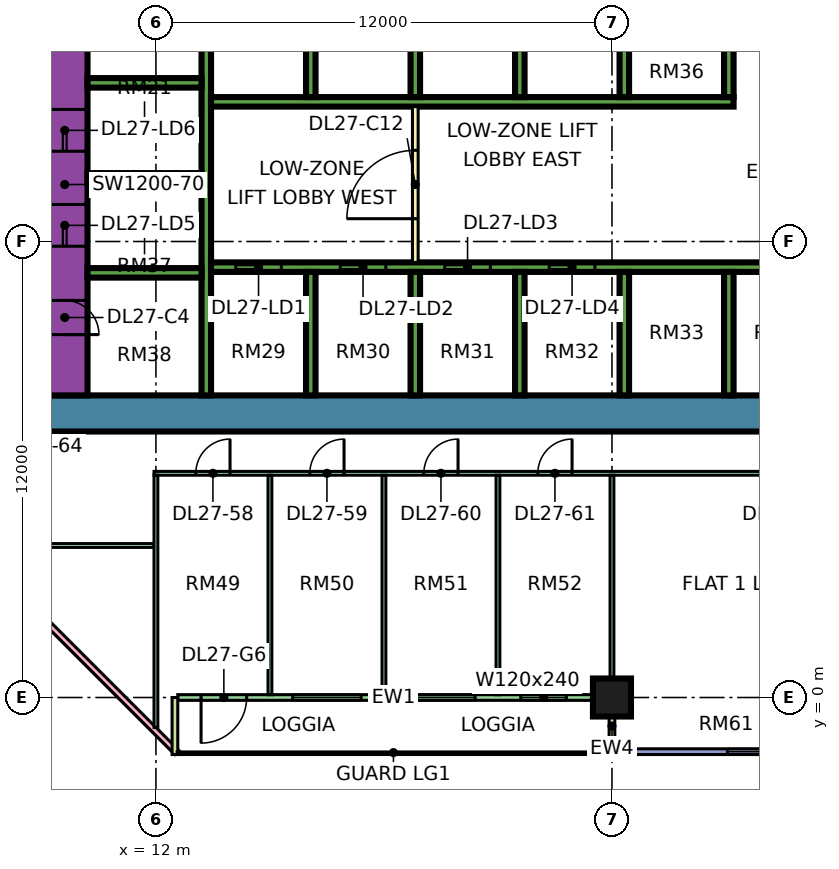
"""IFC4 building model, lengths in metres.
Left out: names, types, materials, properties, quantities, classifications, styles, units other than length and angle.
Written with IfcOpenShell. Run it as: python <this file> out.ifc"""

import sys

from ifc_helpers import new_model, si_unit, direction, frame, frame_2d, origin, origin_2d, place, context, subcontext, project, spatial, rectangle, extrude, element, fill, save


model = new_model("IFC4")
c1 = context("Model", 3, precision=1e-05, world=origin(), true_north=direction((0.0, 1.0)))
c2 = subcontext(c1, "Body", "Model", "MODEL_VIEW")
j1 = project(units=[si_unit("LENGTHUNIT", "METRE"), si_unit("PLANEANGLEUNIT", "RADIAN")], contexts=[c1])
p1 = place(None, origin())
s1 = spatial("IfcSite", under=j1, at=p1, CompositionType="ELEMENT")
p2 = place(p1, origin())
s2 = spatial("IfcBuilding", under=s1, at=p2, CompositionType="ELEMENT")
p3 = place(p2, frame((0.0, 0.0, 118.15)))
s3 = spatial("IfcBuildingStorey", under=s2, at=p3, CompositionType="ELEMENT", Elevation=118.15)
p4 = place(p3, frame((24.0, 0.0, 0.0), z_axis=(0.0, 0.0, 1.0), x_axis=(1.0, 0.0, 0.0)))
e1 = element("IfcColumn", 1, at=p4, inside=s3, PredefinedType="COLUMN", context=c2, shape_type="SweptSolid", body=[
    extrude(rectangle(XDim=1.0, YDim=1.0, at=origin_2d()), origin(), (0.0, 0.0, 1.0), 3.75),
])
p5 = place(p3, frame((9.0, 7.475, 0.0), z_axis=(0.0, 0.0, 1.0), x_axis=(1.0, 0.0, 0.0)))
e2 = element("IfcWall", 2, at=p5, inside=s3, PredefinedType="SHEAR", context=c2, shape_type="SweptSolid", body=[
    extrude(rectangle(XDim=25.0, YDim=0.95, at=frame_2d((12.5, 0.0))), origin(), (0.0, 0.0, 1.0), 3.75),
])
p6 = place(p3, frame((9.6, 7.95, 0.0), z_axis=(0.0, 0.0, 1.0), x_axis=(0.0, 1.0, 0.0)))
e3 = element("IfcWall", 3, at=p6, inside=s3, PredefinedType="SHEAR", context=c2, shape_type="SweptSolid", body=[
    extrude(rectangle(XDim=11.1, YDim=1.2, at=frame_2d((5.55, 0.0))), origin(), (0.0, 0.0, 1.0), 3.75),
])
p7 = place(p6, frame((3.925, 0.0, 0.0)))
e4 = element("IfcOpeningElement", 4, at=p7, cuts=e3, PredefinedType="OPENING", context=c2, shape_type="SweptSolid", body=[
    extrude(rectangle(XDim=1.1, YDim=2.2, at=frame_2d((0.55, 1.1))), frame((0.0, 0.61, 0.0), z_axis=(0.0, -1.0, 0.0), x_axis=(1.0, 0.0, 0.0)), (0.0, 0.0, 1.0), 1.22),
])
p8 = place(p6, frame((6.425, 0.0, 0.0)))
e5 = element("IfcOpeningElement", 5, at=p8, cuts=e3, PredefinedType="OPENING", context=c2, shape_type="SweptSolid", body=[
    extrude(rectangle(XDim=1.1, YDim=2.2, at=frame_2d((0.55, 1.1))), frame((0.0, 0.61, 0.0), z_axis=(0.0, -1.0, 0.0), x_axis=(1.0, 0.0, 0.0)), (0.0, 0.0, 1.0), 1.22),
])
p9 = place(p6, frame((9.175, 0.0, 0.0)))
e6 = element("IfcOpeningElement", 6, at=p9, cuts=e3, PredefinedType="OPENING", context=c2, shape_type="SweptSolid", body=[
    extrude(rectangle(XDim=1.1, YDim=2.2, at=frame_2d((0.55, 1.1))), frame((0.0, 0.61, 0.0), z_axis=(0.0, -1.0, 0.0), x_axis=(1.0, 0.0, 0.0)), (0.0, 0.0, 1.0), 1.22),
])
p10 = place(p6, frame((1.6, 0.0, 0.0)))
e7 = element("IfcOpeningElement", 7, at=p10, cuts=e3, PredefinedType="OPENING", context=c2, shape_type="SweptSolid", body=[
    extrude(rectangle(XDim=0.9, YDim=2.1, at=frame_2d((0.45, 1.05))), frame((0.0, 0.61, 0.0), z_axis=(0.0, -1.0, 0.0), x_axis=(1.0, 0.0, 0.0)), (0.0, 0.0, 1.0), 1.22),
])
p11 = place(p3, frame((13.325, 7.95, 0.0), z_axis=(0.0, 0.0, 1.0), x_axis=(0.0, 1.0, 0.0)))
e8 = element("IfcWall", 8, at=p11, inside=s3, PredefinedType="SHEAR", context=c2, shape_type="SweptSolid", body=[
    extrude(rectangle(XDim=11.1, YDim=0.25, at=frame_2d((5.55, 0.0))), origin(), (0.0, 0.0, 1.0), 3.75),
])
p12 = place(p3, frame((13.45, 11.325, 0.0), z_axis=(0.0, 0.0, 1.0), x_axis=(1.0, 0.0, 0.0)))
e9 = element("IfcWall", 9, at=p12, inside=s3, PredefinedType="SHEAR", context=c2, shape_type="SweptSolid", body=[
    extrude(rectangle(XDim=19.6, YDim=0.25, at=frame_2d((9.8, 0.0))), origin(), (0.0, 0.0, 1.0), 3.75),
])
p13 = place(p12, frame((0.65, 0.0, 0.0)))
e10 = element("IfcOpeningElement", 10, at=p13, cuts=e9, PredefinedType="OPENING", context=c2, shape_type="SweptSolid", body=[
    extrude(rectangle(XDim=1.2, YDim=2.2, at=frame_2d((0.6, 1.1))), frame((0.0, 0.135, 0.0), z_axis=(0.0, -1.0, 0.0), x_axis=(1.0, 0.0, 0.0)), (0.0, 0.0, 1.0), 0.27),
])
p14 = place(p12, frame((3.4, 0.0, 0.0)))
e11 = element("IfcOpeningElement", 11, at=p14, cuts=e9, PredefinedType="OPENING", context=c2, shape_type="SweptSolid", body=[
    extrude(rectangle(XDim=1.2, YDim=2.2, at=frame_2d((0.6, 1.1))), frame((0.0, 0.135, 0.0), z_axis=(0.0, -1.0, 0.0), x_axis=(1.0, 0.0, 0.0)), (0.0, 0.0, 1.0), 0.27),
])
p15 = place(p12, frame((6.15, 0.0, 0.0)))
e12 = element("IfcOpeningElement", 12, at=p15, cuts=e9, PredefinedType="OPENING", context=c2, shape_type="SweptSolid", body=[
    extrude(rectangle(XDim=1.2, YDim=2.2, at=frame_2d((0.6, 1.1))), frame((0.0, 0.135, 0.0), z_axis=(0.0, -1.0, 0.0), x_axis=(1.0, 0.0, 0.0)), (0.0, 0.0, 1.0), 0.27),
])
p16 = place(p12, frame((8.9, 0.0, 0.0)))
e13 = element("IfcOpeningElement", 13, at=p16, cuts=e9, PredefinedType="OPENING", context=c2, shape_type="SweptSolid", body=[
    extrude(rectangle(XDim=1.2, YDim=2.2, at=frame_2d((0.6, 1.1))), frame((0.0, 0.135, 0.0), z_axis=(0.0, -1.0, 0.0), x_axis=(1.0, 0.0, 0.0)), (0.0, 0.0, 1.0), 0.27),
])
p17 = place(p3, frame((13.45, 15.675, 0.0), z_axis=(0.0, 0.0, 1.0), x_axis=(1.0, 0.0, 0.0)))
e14 = element("IfcWall", 14, at=p17, inside=s3, PredefinedType="SHEAR", context=c2, shape_type="SweptSolid", body=[
    extrude(rectangle(XDim=13.75, YDim=0.25, at=frame_2d((6.875, 0.0))), origin(), (0.0, 0.0, 1.0), 3.75),
])
for number, where, z_axis, x_axis in (
    (15, (10.2, 11.175, 0.0), (0.0, 0.0, 1.0), (1.0, 0.0, 0.0)),
    (16, (10.2, 13.675, 0.0), (0.0, 0.0, 1.0), (1.0, 0.0, 0.0)),
    (17, (10.2, 16.175, 0.0), (0.0, 0.0, 1.0), (1.0, 0.0, 0.0)),
):
    element("IfcWall", number, at=place(p3, frame(where, z_axis=z_axis, x_axis=x_axis)), inside=s3, PredefinedType="SHEAR", context=c2, shape_type="SweptSolid", body=[
        extrude(rectangle(XDim=3.0, YDim=0.25, at=frame_2d((1.5, 0.0))), origin(), (0.0, 0.0, 1.0), 3.75),
    ])
for number, where, z_axis, x_axis in (
    (18, (16.075, 7.95, 0.0), (0.0, 0.0, 1.0), (0.0, 1.0, 0.0)),
    (19, (18.825, 7.95, 0.0), (0.0, 0.0, 1.0), (0.0, 1.0, 0.0)),
    (20, (21.575, 7.95, 0.0), (0.0, 0.0, 1.0), (0.0, 1.0, 0.0)),
    (21, (24.325, 7.95, 0.0), (0.0, 0.0, 1.0), (0.0, 1.0, 0.0)),
    (22, (27.075, 7.95, 0.0), (0.0, 0.0, 1.0), (0.0, 1.0, 0.0)),
    (23, (16.075, 15.8, 0.0), (0.0, 0.0, 1.0), (0.0, 1.0, 0.0)),
    (24, (18.825, 15.8, 0.0), (0.0, 0.0, 1.0), (0.0, 1.0, 0.0)),
    (25, (21.575, 15.8, 0.0), (0.0, 0.0, 1.0), (0.0, 1.0, 0.0)),
    (26, (24.325, 15.8, 0.0), (0.0, 0.0, 1.0), (0.0, 1.0, 0.0)),
    (27, (27.075, 15.8, 0.0), (0.0, 0.0, 1.0), (0.0, 1.0, 0.0)),
):
    element("IfcWall", number, at=place(p3, frame(where, z_axis=z_axis, x_axis=x_axis)), inside=s3, PredefinedType="SHEAR", context=c2, shape_type="SweptSolid", body=[
        extrude(rectangle(XDim=3.25, YDim=0.25, at=frame_2d((1.625, 0.0))), origin(), (0.0, 0.0, 1.0), 3.75),
    ])
p18 = place(p3, frame((-1.447, 12.553, 0.0), z_axis=(0.0, 0.0, 1.0), x_axis=(0.707106781187, -0.707106781187, 0.0)))
e28 = element("IfcWall", 28, at=p18, inside=s3, PredefinedType="SOLIDWALL", context=c2, shape_type="SweptSolid", body=[
    extrude(rectangle(XDim=19.799, YDim=0.15, at=frame_2d((9.899, 0.0))), origin(), (0.0, 0.0, 1.0), 3.35),
])
p19 = place(p18, frame((2.212, 0.0, 0.45)))
e29 = element("IfcOpeningElement", 29, at=p19, cuts=e28, PredefinedType="OPENING", context=c2, shape_type="SweptSolid", body=[
    extrude(rectangle(XDim=3.0, YDim=2.4, at=frame_2d((1.5, 1.2))), frame((0.0, 0.085, 0.0), z_axis=(0.0, -1.0, 0.0), x_axis=(1.0, 0.0, 0.0)), (0.0, 0.0, 1.0), 0.17),
])
p20 = place(p18, frame((10.216, 0.0, 0.45)))
e30 = element("IfcOpeningElement", 30, at=p20, cuts=e28, PredefinedType="OPENING", context=c2, shape_type="SweptSolid", body=[
    extrude(rectangle(XDim=3.0, YDim=2.4, at=frame_2d((1.5, 1.2))), frame((0.0, 0.085, 0.0), z_axis=(0.0, -1.0, 0.0), x_axis=(1.0, 0.0, 0.0)), (0.0, 0.0, 1.0), 0.17),
])
p21 = place(p3, frame((12.575, 0.0, 0.0), z_axis=(0.0, 0.0, 1.0), x_axis=(1.0, 0.0, 0.0)))
e31 = element("IfcWall", 31, at=p21, inside=s3, PredefinedType="SOLIDWALL", context=c2, shape_type="SweptSolid", body=[
    extrude(rectangle(XDim=11.35, YDim=0.15, at=frame_2d((5.675, 0.0))), origin(), (0.0, 0.0, 1.0), 3.35),
])
p22 = place(p21, frame((0.613, 0.0, 0.0)))
e32 = element("IfcOpeningElement", 32, at=p22, cuts=e31, PredefinedType="OPENING", context=c2, shape_type="SweptSolid", body=[
    extrude(rectangle(XDim=1.2, YDim=2.4, at=frame_2d((0.6, 1.2))), frame((0.0, 0.085, 0.0), z_axis=(0.0, -1.0, 0.0), x_axis=(1.0, 0.0, 0.0)), (0.0, 0.0, 1.0), 0.17),
])
p23 = place(p21, frame((3.025, 0.0, 0.45)))
e33 = element("IfcOpeningElement", 33, at=p23, cuts=e31, PredefinedType="OPENING", context=c2, shape_type="SweptSolid", body=[
    extrude(rectangle(XDim=1.8, YDim=2.4, at=frame_2d((0.9, 1.2))), frame((0.0, 0.085, 0.0), z_axis=(0.0, -1.0, 0.0), x_axis=(1.0, 0.0, 0.0)), (0.0, 0.0, 1.0), 0.17),
])
p24 = place(p21, frame((6.025, 0.0, 0.45)))
e34 = element("IfcOpeningElement", 34, at=p24, cuts=e31, PredefinedType="OPENING", context=c2, shape_type="SweptSolid", body=[
    extrude(rectangle(XDim=1.8, YDim=2.4, at=frame_2d((0.9, 1.2))), frame((0.0, 0.085, 0.0), z_axis=(0.0, -1.0, 0.0), x_axis=(1.0, 0.0, 0.0)), (0.0, 0.0, 1.0), 0.17),
])
p25 = place(p21, frame((9.025, 0.0, 0.45)))
e35 = element("IfcOpeningElement", 35, at=p25, cuts=e31, PredefinedType="OPENING", context=c2, shape_type="SweptSolid", body=[
    extrude(rectangle(XDim=1.2, YDim=2.4, at=frame_2d((0.6, 1.2))), frame((0.0, 0.085, 0.0), z_axis=(0.0, -1.0, 0.0), x_axis=(1.0, 0.0, 0.0)), (0.0, 0.0, 1.0), 0.17),
])
for number, where, z_axis, x_axis in (
    (36, (12.5, -1.5, 0.0), (0.0, 0.0, 1.0), (0.0, 1.0, 0.0)),
    (37, (24.0, -1.5, 0.0), (0.0, 0.0, 1.0), (0.0, 1.0, 0.0)),
):
    element("IfcWall", number, at=place(p3, frame(where, z_axis=z_axis, x_axis=x_axis)), inside=s3, PredefinedType="SOLIDWALL", context=c2, shape_type="SweptSolid", body=[
        extrude(rectangle(XDim=1.5, YDim=0.15, at=frame_2d((0.75, 0.0))), origin(), (0.0, 0.0, 1.0), 3.35),
    ])
p26 = place(p3, frame((24.075, -1.425, 0.0), z_axis=(0.0, 0.0, 1.0), x_axis=(1.0, 0.0, 0.0)))
e38 = element("IfcWall", 38, at=p26, inside=s3, PredefinedType="SOLIDWALL", context=c2, shape_type="SweptSolid", body=[
    extrude(rectangle(XDim=11.85, YDim=0.15, at=frame_2d((5.925, 0.0))), origin(), (0.0, 0.0, 1.0), 3.35),
])
p27 = place(p26, frame((2.962, 0.0, 0.45)))
e39 = element("IfcOpeningElement", 39, at=p27, cuts=e38, PredefinedType="OPENING", context=c2, shape_type="SweptSolid", body=[
    extrude(rectangle(XDim=3.0, YDim=2.4, at=frame_2d((1.5, 1.2))), frame((0.0, 0.085, 0.0), z_axis=(0.0, -1.0, 0.0), x_axis=(1.0, 0.0, 0.0)), (0.0, 0.0, 1.0), 0.17),
])
p28 = place(p26, frame((9.488, 0.0, 0.45)))
e40 = element("IfcOpeningElement", 40, at=p28, cuts=e38, PredefinedType="OPENING", context=c2, shape_type="SweptSolid", body=[
    extrude(rectangle(XDim=1.8, YDim=2.4, at=frame_2d((0.9, 1.2))), frame((0.0, 0.085, 0.0), z_axis=(0.0, -1.0, 0.0), x_axis=(1.0, 0.0, 0.0)), (0.0, 0.0, 1.0), 0.17),
])
p29 = place(p3, frame((18.825, 11.45, 0.0), z_axis=(0.0, 0.0, 1.0), x_axis=(0.0, 1.0, 0.0)))
e41 = element("IfcWall", 41, at=p29, inside=s3, PredefinedType="PARTITIONING", context=c2, shape_type="SweptSolid", body=[
    extrude(rectangle(XDim=4.1, YDim=0.15, at=frame_2d((2.05, 0.0))), origin(), (0.0, 0.0, 1.0), 3.35),
])
p30 = place(p29, frame((1.15, 0.0, 0.0)))
e42 = element("IfcOpeningElement", 42, at=p30, cuts=e41, PredefinedType="OPENING", context=c2, shape_type="SweptSolid", body=[
    extrude(rectangle(XDim=1.8, YDim=2.4, at=frame_2d((0.9, 1.2))), frame((0.0, 0.085, 0.0), z_axis=(0.0, -1.0, 0.0), x_axis=(1.0, 0.0, 0.0)), (0.0, 0.0, 1.0), 0.17),
])
p31 = place(p3, frame((9.05, 4.0, 0.0), z_axis=(0.0, 0.0, 1.0), x_axis=(1.0, 0.0, 0.0)))
e43 = element("IfcWall", 43, at=p31, inside=s3, PredefinedType="PARTITIONING", context=c2, shape_type="SweptSolid", body=[
    extrude(rectangle(XDim=2.9, YDim=0.1, at=frame_2d((1.45, 0.0))), origin(), (0.0, 0.0, 1.0), 3.35),
])
p32 = place(p3, frame((11.95, 5.9, 0.0), z_axis=(0.0, 0.0, 1.0), x_axis=(1.0, 0.0, 0.0)))
e44 = element("IfcWall", 44, at=p32, inside=s3, PredefinedType="PARTITIONING", context=c2, shape_type="SweptSolid", body=[
    extrude(rectangle(XDim=21.1, YDim=0.1, at=frame_2d((10.55, 0.0))), origin(), (0.0, 0.0, 1.0), 3.35),
])
p33 = place(p32, frame((1.1, 0.0, 0.0)))
e45 = element("IfcOpeningElement", 45, at=p33, cuts=e44, PredefinedType="OPENING", context=c2, shape_type="SweptSolid", body=[
    extrude(rectangle(XDim=0.9, YDim=2.1, at=frame_2d((0.45, 1.05))), frame((0.0, 0.06, 0.0), z_axis=(0.0, -1.0, 0.0), x_axis=(1.0, 0.0, 0.0)), (0.0, 0.0, 1.0), 0.12),
])
p34 = place(p32, frame((4.1, 0.0, 0.0)))
e46 = element("IfcOpeningElement", 46, at=p34, cuts=e44, PredefinedType="OPENING", context=c2, shape_type="SweptSolid", body=[
    extrude(rectangle(XDim=0.9, YDim=2.1, at=frame_2d((0.45, 1.05))), frame((0.0, 0.06, 0.0), z_axis=(0.0, -1.0, 0.0), x_axis=(1.0, 0.0, 0.0)), (0.0, 0.0, 1.0), 0.12),
])
p35 = place(p32, frame((7.1, 0.0, 0.0)))
e47 = element("IfcOpeningElement", 47, at=p35, cuts=e44, PredefinedType="OPENING", context=c2, shape_type="SweptSolid", body=[
    extrude(rectangle(XDim=0.9, YDim=2.1, at=frame_2d((0.45, 1.05))), frame((0.0, 0.06, 0.0), z_axis=(0.0, -1.0, 0.0), x_axis=(1.0, 0.0, 0.0)), (0.0, 0.0, 1.0), 0.12),
])
p36 = place(p32, frame((10.1, 0.0, 0.0)))
e48 = element("IfcOpeningElement", 48, at=p36, cuts=e44, PredefinedType="OPENING", context=c2, shape_type="SweptSolid", body=[
    extrude(rectangle(XDim=0.9, YDim=2.1, at=frame_2d((0.45, 1.05))), frame((0.0, 0.06, 0.0), z_axis=(0.0, -1.0, 0.0), x_axis=(1.0, 0.0, 0.0)), (0.0, 0.0, 1.0), 0.12),
])
p37 = place(p32, frame((16.1, 0.0, 0.0)))
e49 = element("IfcOpeningElement", 49, at=p37, cuts=e44, PredefinedType="OPENING", context=c2, shape_type="SweptSolid", body=[
    extrude(rectangle(XDim=0.9, YDim=2.1, at=frame_2d((0.45, 1.05))), frame((0.0, 0.06, 0.0), z_axis=(0.0, -1.0, 0.0), x_axis=(1.0, 0.0, 0.0)), (0.0, 0.0, 1.0), 0.12),
])
p38 = place(p3, frame((12.0, -0.788, 0.0), z_axis=(0.0, 0.0, 1.0), x_axis=(0.0, 1.0, 0.0)))
e50 = element("IfcWall", 50, at=p38, inside=s3, PredefinedType="PARTITIONING", context=c2, shape_type="SweptSolid", body=[
    extrude(rectangle(XDim=6.638, YDim=0.1, at=frame_2d((3.319, 0.0))), origin(), (0.0, 0.0, 1.0), 3.35),
])
for number, where, z_axis, x_axis in (
    (51, (15.0, 0.074, 0.0), (0.0, 0.0, 1.0), (0.0, 1.0, 0.0)),
    (52, (18.0, 0.074, 0.0), (0.0, 0.0, 1.0), (0.0, 1.0, 0.0)),
    (53, (21.0, 0.074, 0.0), (0.0, 0.0, 1.0), (0.0, 1.0, 0.0)),
):
    element("IfcWall", number, at=place(p3, frame(where, z_axis=z_axis, x_axis=x_axis)), inside=s3, PredefinedType="PARTITIONING", context=c2, shape_type="SweptSolid", body=[
        extrude(rectangle(XDim=5.776, YDim=0.1, at=frame_2d((2.888, 0.0))), origin(), (0.0, 0.0, 1.0), 3.35),
    ])
p39 = place(p3, frame((24.0, 0.0, 0.0), z_axis=(0.0, 0.0, 1.0), x_axis=(0.0, 1.0, 0.0)))
e54 = element("IfcWall", 54, at=p39, inside=s3, PredefinedType="PARTITIONING", context=c2, shape_type="SweptSolid", body=[
    extrude(rectangle(XDim=5.85, YDim=0.1, at=frame_2d((2.925, 0.0))), origin(), (0.0, 0.0, 1.0), 3.35),
])
p40 = place(p22, frame((1.2, 0.0, 0.0), z_axis=(0.0, 0.0, 1.0), x_axis=(-1.0, 0.0, 0.0)))
e55 = element("IfcDoor", 55, at=p40, inside=s3, OperationType="DOUBLE_DOOR_SINGLE_SWING", PredefinedType="DOOR", context=c2, shape_type="SweptSolid", body=[
    extrude(rectangle(XDim=1.2, YDim=2.4, at=frame_2d((0.6, 1.2))), frame((0.0, 0.025, 0.0), z_axis=(0.0, -1.0, 0.0), x_axis=(1.0, 0.0, 0.0)), (0.0, 0.0, 1.0), 0.05),
])
fill(e32, e55)
p41 = place(p23, origin())
e56 = element("IfcWindow", 56, at=p41, inside=s3, PartitioningType="SINGLE_PANEL", PredefinedType="WINDOW", context=c2, shape_type="SweptSolid", body=[
    extrude(rectangle(XDim=1.8, YDim=2.4, at=frame_2d((0.9, 1.2))), frame((0.0, 0.03, 0.0), z_axis=(0.0, -1.0, 0.0), x_axis=(1.0, 0.0, 0.0)), (0.0, 0.0, 1.0), 0.06),
])
fill(e33, e56)
p42 = place(p24, origin())
e57 = element("IfcWindow", 57, at=p42, inside=s3, PartitioningType="SINGLE_PANEL", PredefinedType="WINDOW", context=c2, shape_type="SweptSolid", body=[
    extrude(rectangle(XDim=1.8, YDim=2.4, at=frame_2d((0.9, 1.2))), frame((0.0, 0.03, 0.0), z_axis=(0.0, -1.0, 0.0), x_axis=(1.0, 0.0, 0.0)), (0.0, 0.0, 1.0), 0.06),
])
fill(e34, e57)
p43 = place(p25, origin())
e58 = element("IfcWindow", 58, at=p43, inside=s3, PartitioningType="SINGLE_PANEL", PredefinedType="WINDOW", context=c2, shape_type="SweptSolid", body=[
    extrude(rectangle(XDim=1.2, YDim=2.4, at=frame_2d((0.6, 1.2))), frame((0.0, 0.03, 0.0), z_axis=(0.0, -1.0, 0.0), x_axis=(1.0, 0.0, 0.0)), (0.0, 0.0, 1.0), 0.06),
])
fill(e35, e58)
p44 = place(p27, origin())
e59 = element("IfcWindow", 59, at=p44, inside=s3, PartitioningType="SINGLE_PANEL", PredefinedType="WINDOW", context=c2, shape_type="SweptSolid", body=[
    extrude(rectangle(XDim=3.0, YDim=2.4, at=frame_2d((1.5, 1.2))), frame((0.0, 0.03, 0.0), z_axis=(0.0, -1.0, 0.0), x_axis=(1.0, 0.0, 0.0)), (0.0, 0.0, 1.0), 0.06),
])
fill(e39, e59)
p45 = place(p13, origin())
e60 = element("IfcDoor", 60, at=p45, inside=s3, OperationType="DOUBLE_DOOR_SLIDING", PredefinedType="DOOR", context=c2, shape_type="SweptSolid", body=[
    extrude(rectangle(XDim=1.2, YDim=2.2, at=frame_2d((0.6, 1.1))), frame((0.0, 0.025, 0.0), z_axis=(0.0, -1.0, 0.0), x_axis=(1.0, 0.0, 0.0)), (0.0, 0.0, 1.0), 0.05),
])
fill(e10, e60)
p46 = place(p14, origin())
e61 = element("IfcDoor", 61, at=p46, inside=s3, OperationType="DOUBLE_DOOR_SLIDING", PredefinedType="DOOR", context=c2, shape_type="SweptSolid", body=[
    extrude(rectangle(XDim=1.2, YDim=2.2, at=frame_2d((0.6, 1.1))), frame((0.0, 0.025, 0.0), z_axis=(0.0, -1.0, 0.0), x_axis=(1.0, 0.0, 0.0)), (0.0, 0.0, 1.0), 0.05),
])
fill(e11, e61)
p47 = place(p15, origin())
e62 = element("IfcDoor", 62, at=p47, inside=s3, OperationType="DOUBLE_DOOR_SLIDING", PredefinedType="DOOR", context=c2, shape_type="SweptSolid", body=[
    extrude(rectangle(XDim=1.2, YDim=2.2, at=frame_2d((0.6, 1.1))), frame((0.0, 0.025, 0.0), z_axis=(0.0, -1.0, 0.0), x_axis=(1.0, 0.0, 0.0)), (0.0, 0.0, 1.0), 0.05),
])
fill(e12, e62)
p48 = place(p16, origin())
e63 = element("IfcDoor", 63, at=p48, inside=s3, OperationType="DOUBLE_DOOR_SLIDING", PredefinedType="DOOR", context=c2, shape_type="SweptSolid", body=[
    extrude(rectangle(XDim=1.2, YDim=2.2, at=frame_2d((0.6, 1.1))), frame((0.0, 0.025, 0.0), z_axis=(0.0, -1.0, 0.0), x_axis=(1.0, 0.0, 0.0)), (0.0, 0.0, 1.0), 0.05),
])
fill(e13, e63)
p49 = place(p7, origin())
e64 = element("IfcDoor", 64, at=p49, inside=s3, OperationType="DOUBLE_DOOR_SLIDING", PredefinedType="DOOR", context=c2, shape_type="SweptSolid", body=[
    extrude(rectangle(XDim=1.1, YDim=2.2, at=frame_2d((0.55, 1.1))), frame((0.0, 0.025, 0.0), z_axis=(0.0, -1.0, 0.0), x_axis=(1.0, 0.0, 0.0)), (0.0, 0.0, 1.0), 0.05),
])
fill(e4, e64)
p50 = place(p8, origin())
e65 = element("IfcDoor", 65, at=p50, inside=s3, OperationType="DOUBLE_DOOR_SLIDING", PredefinedType="DOOR", context=c2, shape_type="SweptSolid", body=[
    extrude(rectangle(XDim=1.1, YDim=2.2, at=frame_2d((0.55, 1.1))), frame((0.0, 0.025, 0.0), z_axis=(0.0, -1.0, 0.0), x_axis=(1.0, 0.0, 0.0)), (0.0, 0.0, 1.0), 0.05),
])
fill(e5, e65)
p51 = place(p10, frame((0.9, 0.0, 0.0), z_axis=(0.0, 0.0, 1.0), x_axis=(-1.0, 0.0, 0.0)))
e66 = element("IfcDoor", 66, at=p51, inside=s3, OperationType="SINGLE_SWING_LEFT", PredefinedType="DOOR", context=c2, shape_type="SweptSolid", body=[
    extrude(rectangle(XDim=0.9, YDim=2.1, at=frame_2d((0.45, 1.05))), frame((0.0, 0.025, 0.0), z_axis=(0.0, -1.0, 0.0), x_axis=(1.0, 0.0, 0.0)), (0.0, 0.0, 1.0), 0.05),
])
fill(e7, e66)
p52 = place(p30, origin())
e67 = element("IfcDoor", 67, at=p52, inside=s3, OperationType="DOUBLE_DOOR_SINGLE_SWING", PredefinedType="DOOR", context=c2, shape_type="SweptSolid", body=[
    extrude(rectangle(XDim=1.8, YDim=2.4, at=frame_2d((0.9, 1.2))), frame((0.0, 0.025, 0.0), z_axis=(0.0, -1.0, 0.0), x_axis=(1.0, 0.0, 0.0)), (0.0, 0.0, 1.0), 0.05),
])
fill(e42, e67)
p53 = place(p33, frame((0.9, 0.0, 0.0), z_axis=(0.0, 0.0, 1.0), x_axis=(-1.0, 0.0, 0.0)))
e68 = element("IfcDoor", 68, at=p53, inside=s3, OperationType="SINGLE_SWING_RIGHT", PredefinedType="DOOR", context=c2, shape_type="SweptSolid", body=[
    extrude(rectangle(XDim=0.9, YDim=2.1, at=frame_2d((0.45, 1.05))), frame((0.0, 0.025, 0.0), z_axis=(0.0, -1.0, 0.0), x_axis=(1.0, 0.0, 0.0)), (0.0, 0.0, 1.0), 0.05),
])
fill(e45, e68)
p54 = place(p34, frame((0.9, 0.0, 0.0), z_axis=(0.0, 0.0, 1.0), x_axis=(-1.0, 0.0, 0.0)))
e69 = element("IfcDoor", 69, at=p54, inside=s3, OperationType="SINGLE_SWING_RIGHT", PredefinedType="DOOR", context=c2, shape_type="SweptSolid", body=[
    extrude(rectangle(XDim=0.9, YDim=2.1, at=frame_2d((0.45, 1.05))), frame((0.0, 0.025, 0.0), z_axis=(0.0, -1.0, 0.0), x_axis=(1.0, 0.0, 0.0)), (0.0, 0.0, 1.0), 0.05),
])
fill(e46, e69)
p55 = place(p35, frame((0.9, 0.0, 0.0), z_axis=(0.0, 0.0, 1.0), x_axis=(-1.0, 0.0, 0.0)))
e70 = element("IfcDoor", 70, at=p55, inside=s3, OperationType="SINGLE_SWING_RIGHT", PredefinedType="DOOR", context=c2, shape_type="SweptSolid", body=[
    extrude(rectangle(XDim=0.9, YDim=2.1, at=frame_2d((0.45, 1.05))), frame((0.0, 0.025, 0.0), z_axis=(0.0, -1.0, 0.0), x_axis=(1.0, 0.0, 0.0)), (0.0, 0.0, 1.0), 0.05),
])
fill(e47, e70)
p56 = place(p36, frame((0.9, 0.0, 0.0), z_axis=(0.0, 0.0, 1.0), x_axis=(-1.0, 0.0, 0.0)))
e71 = element("IfcDoor", 71, at=p56, inside=s3, OperationType="SINGLE_SWING_RIGHT", PredefinedType="DOOR", context=c2, shape_type="SweptSolid", body=[
    extrude(rectangle(XDim=0.9, YDim=2.1, at=frame_2d((0.45, 1.05))), frame((0.0, 0.025, 0.0), z_axis=(0.0, -1.0, 0.0), x_axis=(1.0, 0.0, 0.0)), (0.0, 0.0, 1.0), 0.05),
])
fill(e48, e71)
save(model, sys.argv[1])
